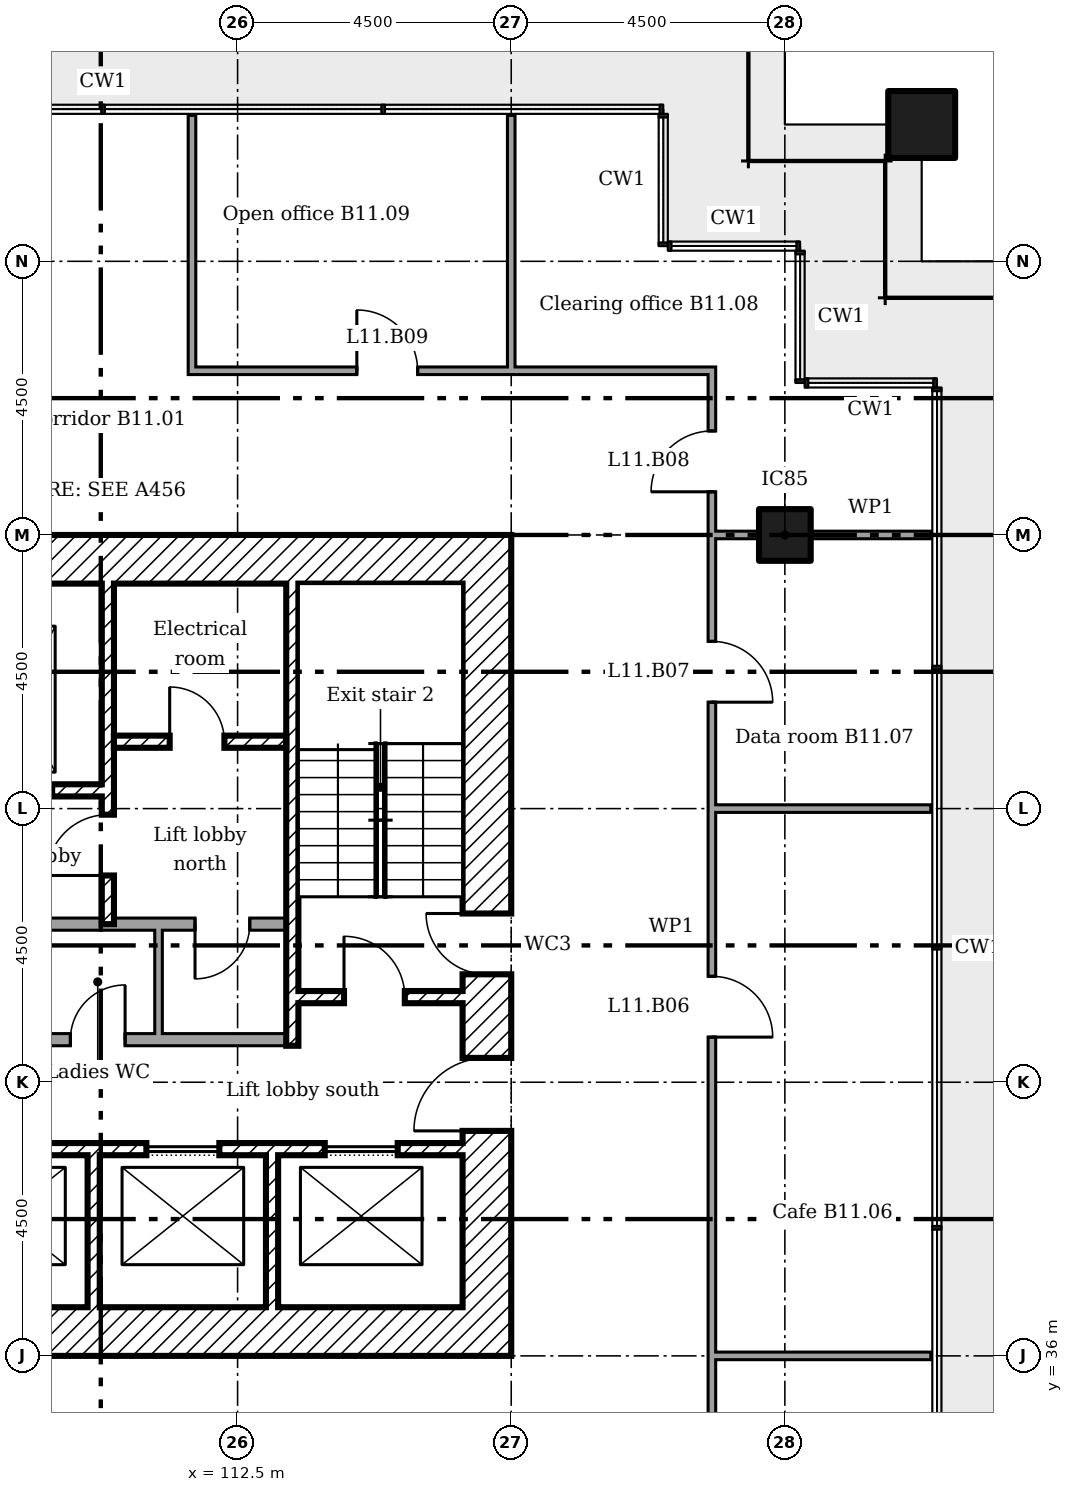
"""IFC4 building model, lengths in metres.
Left out: names, types, materials, properties, quantities, classifications, styles, units other than length and angle.
Written with IfcOpenShell. Run it as: python <this file> out.ifc"""

import sys

from ifc_helpers import new_model, si_unit, direction, frame, frame_2d, origin, origin_2d, place, context, subcontext, project, spatial, rectangle, extrude, element, fill, save


model = new_model("IFC4")
c1 = context("Model", 3, precision=1e-05, world=origin(), true_north=direction((0.0, 1.0)))
c2 = subcontext(c1, "Body", "Model", "MODEL_VIEW")
j1 = project(units=[si_unit("LENGTHUNIT", "METRE"), si_unit("PLANEANGLEUNIT", "RADIAN")], contexts=[c1])
p1 = place(None, origin())
s1 = spatial("IfcSite", under=j1, at=p1, CompositionType="ELEMENT")
p2 = place(p1, origin())
s2 = spatial("IfcBuilding", under=s1, at=p2, CompositionType="ELEMENT")
p3 = place(p2, frame((0.0, 0.0, 51.0)))
s3 = spatial("IfcBuildingStorey", under=s2, at=p3, CompositionType="ELEMENT", Elevation=51.0)
p4 = place(p3, frame((123.75, 56.25, 0.0)))
e1 = element("IfcColumn", 1, at=p4, inside=s3, PredefinedType="COLUMN", context=c2, shape_type="SweptSolid", body=[
    extrude(rectangle(XDim=1.1, YDim=1.1, at=origin_2d()), origin(), (0.0, 0.0, 1.0), 3.6),
])
p5 = place(p3, frame((121.5, 49.5, 0.0)))
e2 = element("IfcColumn", 2, at=p5, inside=s3, PredefinedType="COLUMN", context=c2, shape_type="SweptSolid", body=[
    extrude(rectangle(XDim=0.85, YDim=0.85, at=origin_2d()), origin(), (0.0, 0.0, 1.0), 3.6),
])
p6 = place(p3, frame((116.6, 36.0, 0.0), z_axis=(0.0, 0.0, 1.0), x_axis=(0.0, 1.0, 0.0)))
e3 = element("IfcWall", 3, at=p6, inside=s3, PredefinedType="SHEAR", context=c2, shape_type="SweptSolid", body=[
    extrude(rectangle(XDim=13.5, YDim=0.8, at=frame_2d((6.75, 0.0))), origin(), (0.0, 0.0, 1.0), 3.35),
])
p7 = place(p6, frame((3.7, 0.0, 0.0)))
e4 = element("IfcOpeningElement", 4, at=p7, cuts=e3, PredefinedType="OPENING", context=c2, shape_type="SweptSolid", body=[
    extrude(rectangle(XDim=1.2, YDim=2.1, at=frame_2d((0.6, 1.05))), frame((0.0, 0.41, 0.0), z_axis=(0.0, -1.0, 0.0), x_axis=(1.0, 0.0, 0.0)), (0.0, 0.0, 1.0), 0.82),
])
p8 = place(p6, frame((6.275, 0.0, 0.0)))
e5 = element("IfcOpeningElement", 5, at=p8, cuts=e3, PredefinedType="OPENING", context=c2, shape_type="SweptSolid", body=[
    extrude(rectangle(XDim=1.0, YDim=2.1, at=frame_2d((0.5, 1.05))), frame((0.0, 0.41, 0.0), z_axis=(0.0, -1.0, 0.0), x_axis=(1.0, 0.0, 0.0)), (0.0, 0.0, 1.0), 0.82),
])
for number, where in (
    (6, (104.3, 49.1, 0.0)),
    (7, (104.3, 36.4, 0.0)),
):
    element("IfcWall", number, at=place(p3, frame(where)), inside=s3, PredefinedType="SHEAR", context=c2, shape_type="SweptSolid", body=[
        extrude(rectangle(XDim=11.9, YDim=0.8, at=frame_2d((5.95, 0.0))), origin(), (0.0, 0.0, 1.0), 3.35),
    ])
p9 = place(p3, frame((110.367, 48.7, 0.0), z_axis=(0.0, 0.0, 1.0), x_axis=(0.0, -1.0, 0.0)))
e8 = element("IfcWall", 8, at=p9, inside=s3, PredefinedType="SHEAR", context=c2, shape_type="SweptSolid", body=[
    extrude(rectangle(XDim=5.6, YDim=0.2, at=frame_2d((2.8, 0.0))), origin(), (0.0, 0.0, 1.0), 3.35),
])
p10 = place(p9, frame((3.8, 0.0, 0.0)))
e9 = element("IfcOpeningElement", 9, at=p10, cuts=e8, PredefinedType="OPENING", context=c2, shape_type="SweptSolid", body=[
    extrude(rectangle(XDim=1.0, YDim=2.1, at=frame_2d((0.5, 1.05))), frame((0.0, 0.11, 0.0), z_axis=(0.0, -1.0, 0.0), x_axis=(1.0, 0.0, 0.0)), (0.0, 0.0, 1.0), 0.22),
])
for number, where, z_axis, x_axis in (
    (10, (110.133, 36.8, 0.0), (0.0, 0.0, 1.0), (0.0, 1.0, 0.0)),
    (11, (113.067, 36.8, 0.0), (0.0, 0.0, 1.0), (0.0, 1.0, 0.0)),
):
    element("IfcWall", number, at=place(p3, frame(where, z_axis=z_axis, x_axis=x_axis)), inside=s3, PredefinedType="SHEAR", context=c2, shape_type="SweptSolid", body=[
        extrude(rectangle(XDim=2.5, YDim=0.2, at=frame_2d((1.25, 0.0))), origin(), (0.0, 0.0, 1.0), 3.35),
    ])
p11 = place(p3, frame((110.467, 46.1, 0.0)))
e12 = element("IfcWall", 12, at=p11, inside=s3, PredefinedType="SHEAR", context=c2, shape_type="SweptSolid", body=[
    extrude(rectangle(XDim=2.833, YDim=0.2, at=frame_2d((1.417, 0.0))), origin(), (0.0, 0.0, 1.0), 3.35),
])
p12 = place(p11, frame((0.917, 0.0, 0.0)))
e13 = element("IfcOpeningElement", 13, at=p12, cuts=e12, PredefinedType="OPENING", context=c2, shape_type="SweptSolid", body=[
    extrude(rectangle(XDim=0.9, YDim=2.1, at=frame_2d((0.45, 1.05))), frame((0.0, 0.11, 0.0), z_axis=(0.0, -1.0, 0.0), x_axis=(1.0, 0.0, 0.0)), (0.0, 0.0, 1.0), 0.22),
])
p13 = place(p3, frame((107.533, 45.3, 0.0)))
e14 = element("IfcWall", 14, at=p13, inside=s3, PredefinedType="SHEAR", context=c2, shape_type="SweptSolid", body=[
    extrude(rectangle(XDim=2.733, YDim=0.2, at=frame_2d((1.367, 0.0))), origin(), (0.0, 0.0, 1.0), 3.35),
])
p14 = place(p13, frame((0.817, 0.0, 0.0)))
e15 = element("IfcOpeningElement", 15, at=p14, cuts=e14, PredefinedType="OPENING", context=c2, shape_type="SweptSolid", body=[
    extrude(rectangle(XDim=1.1, YDim=2.1, at=frame_2d((0.55, 1.05))), frame((0.0, 0.11, 0.0), z_axis=(0.0, -1.0, 0.0), x_axis=(1.0, 0.0, 0.0)), (0.0, 0.0, 1.0), 0.22),
])
p15 = place(p3, frame((107.2, 39.4, 0.0)))
e16 = element("IfcWall", 16, at=p15, inside=s3, PredefinedType="SHEAR", context=c2, shape_type="SweptSolid", body=[
    extrude(rectangle(XDim=9.0, YDim=0.2, at=frame_2d((4.5, 0.0))), origin(), (0.0, 0.0, 1.0), 3.35),
])
p16 = place(p15, frame((0.867, 0.0, 0.0)))
e17 = element("IfcOpeningElement", 17, at=p16, cuts=e16, PredefinedType="OPENING", context=c2, shape_type="SweptSolid", body=[
    extrude(rectangle(XDim=1.2, YDim=2.1, at=frame_2d((0.6, 1.05))), frame((0.0, 0.11, 0.0), z_axis=(0.0, -1.0, 0.0), x_axis=(1.0, 0.0, 0.0)), (0.0, 0.0, 1.0), 0.22),
])
p17 = place(p15, frame((3.8, 0.0, 0.0)))
e18 = element("IfcOpeningElement", 18, at=p17, cuts=e16, PredefinedType="OPENING", context=c2, shape_type="SweptSolid", body=[
    extrude(rectangle(XDim=1.2, YDim=2.1, at=frame_2d((0.6, 1.05))), frame((0.0, 0.11, 0.0), z_axis=(0.0, -1.0, 0.0), x_axis=(1.0, 0.0, 0.0)), (0.0, 0.0, 1.0), 0.22),
])
p18 = place(p15, frame((6.733, 0.0, 0.0)))
e19 = element("IfcOpeningElement", 19, at=p18, cuts=e16, PredefinedType="OPENING", context=c2, shape_type="SweptSolid", body=[
    extrude(rectangle(XDim=1.2, YDim=2.1, at=frame_2d((0.6, 1.05))), frame((0.0, 0.11, 0.0), z_axis=(0.0, -1.0, 0.0), x_axis=(1.0, 0.0, 0.0)), (0.0, 0.0, 1.0), 0.22),
])
p19 = place(p3, frame((113.5, 41.9, 0.0)))
e20 = element("IfcWall", 20, at=p19, inside=s3, PredefinedType="SHEAR", context=c2, shape_type="SweptSolid", body=[
    extrude(rectangle(XDim=2.7, YDim=0.2, at=frame_2d((1.35, 0.0))), origin(), (0.0, 0.0, 1.0), 3.35),
])
p20 = place(p19, frame((0.75, 0.0, 0.0)))
e21 = element("IfcOpeningElement", 21, at=p20, cuts=e20, PredefinedType="OPENING", context=c2, shape_type="SweptSolid", body=[
    extrude(rectangle(XDim=1.0, YDim=2.1, at=frame_2d((0.5, 1.05))), frame((0.0, 0.11, 0.0), z_axis=(0.0, -1.0, 0.0), x_axis=(1.0, 0.0, 0.0)), (0.0, 0.0, 1.0), 0.22),
])
p21 = place(p3, frame((113.4, 41.1, 0.0), z_axis=(0.0, 0.0, 1.0), x_axis=(0.0, 1.0, 0.0)))
e22 = element("IfcWall", 22, at=p21, inside=s3, PredefinedType="SHEAR", context=c2, shape_type="SweptSolid", body=[
    extrude(rectangle(XDim=7.6, YDim=0.2, at=frame_2d((3.8, 0.0))), origin(), (0.0, 0.0, 1.0), 3.35),
])
p22 = place(p3, frame((107.2, 43.1, 0.0)))
e23 = element("IfcWall", 23, at=p22, inside=s3, PredefinedType="PARTITIONING", context=c2, shape_type="SweptSolid", body=[
    extrude(rectangle(XDim=6.1, YDim=0.2, at=frame_2d((3.05, 0.0))), origin(), (0.0, 0.0, 1.0), 3.35),
])
p23 = place(p22, frame((4.6, 0.0, 0.0)))
e24 = element("IfcOpeningElement", 24, at=p23, cuts=e23, PredefinedType="OPENING", context=c2, shape_type="SweptSolid", body=[
    extrude(rectangle(XDim=0.9, YDim=2.1, at=frame_2d((0.45, 1.05))), frame((0.0, 0.11, 0.0), z_axis=(0.0, -1.0, 0.0), x_axis=(1.0, 0.0, 0.0)), (0.0, 0.0, 1.0), 0.22),
])
p24 = place(p3, frame((107.2, 41.2, 0.0)))
e25 = element("IfcWall", 25, at=p24, inside=s3, PredefinedType="PARTITIONING", context=c2, shape_type="SweptSolid", body=[
    extrude(rectangle(XDim=6.1, YDim=0.2, at=frame_2d((3.05, 0.0))), origin(), (0.0, 0.0, 1.0), 3.35),
])
p25 = place(p24, frame((0.55, 0.0, 0.0)))
e26 = element("IfcOpeningElement", 26, at=p25, cuts=e25, PredefinedType="OPENING", context=c2, shape_type="SweptSolid", body=[
    extrude(rectangle(XDim=0.9, YDim=2.1, at=frame_2d((0.45, 1.05))), frame((0.0, 0.11, 0.0), z_axis=(0.0, -1.0, 0.0), x_axis=(1.0, 0.0, 0.0)), (0.0, 0.0, 1.0), 0.22),
])
p26 = place(p24, frame((2.55, 0.0, 0.0)))
e27 = element("IfcOpeningElement", 27, at=p26, cuts=e25, PredefinedType="OPENING", context=c2, shape_type="SweptSolid", body=[
    extrude(rectangle(XDim=0.9, YDim=2.1, at=frame_2d((0.45, 1.05))), frame((0.0, 0.11, 0.0), z_axis=(0.0, -1.0, 0.0), x_axis=(1.0, 0.0, 0.0)), (0.0, 0.0, 1.0), 0.22),
])
p27 = place(p3, frame((111.2, 41.3, 0.0), z_axis=(0.0, 0.0, 1.0), x_axis=(0.0, 1.0, 0.0)))
e28 = element("IfcWall", 28, at=p27, inside=s3, PredefinedType="PARTITIONING", context=c2, shape_type="SweptSolid", body=[
    extrude(rectangle(XDim=1.7, YDim=0.125, at=frame_2d((0.85, 0.0))), origin(), (0.0, 0.0, 1.0), 3.35),
])
for number, where in (
    (29, (120.3, 36.0, 0.0)),
    (30, (120.3, 45.0, 0.0)),
):
    element("IfcWall", number, at=place(p3, frame(where)), inside=s3, PredefinedType="PARTITIONING", context=c2, shape_type="SweptSolid", body=[
        extrude(rectangle(XDim=3.6, YDim=0.125, at=frame_2d((1.8, 0.0))), origin(), (0.0, 0.0, 1.0), 2.851),
    ])
p28 = place(p3, frame((120.3, 49.5, 0.0)))
e31 = element("IfcWall", 31, at=p28, inside=s3, PredefinedType="PARTITIONING", context=c2, shape_type="SweptSolid", body=[
    extrude(rectangle(XDim=0.775, YDim=0.125, at=frame_2d((0.387, 0.0))), origin(), (0.0, 0.0, 1.0), 2.842),
])
p29 = place(p3, frame((121.925, 49.5, 0.0)))
e32 = element("IfcWall", 32, at=p29, inside=s3, PredefinedType="PARTITIONING", context=c2, shape_type="SweptSolid", body=[
    extrude(rectangle(XDim=1.975, YDim=0.125, at=frame_2d((0.987, 0.0))), origin(), (0.0, 0.0, 1.0), 2.842),
])
p30 = place(p3, frame((111.688, 52.2, 0.0)))
e33 = element("IfcWall", 33, at=p30, inside=s3, PredefinedType="PARTITIONING", context=c2, shape_type="SweptSolid", body=[
    extrude(rectangle(XDim=8.675, YDim=0.125, at=frame_2d((4.337, 0.0))), origin(), (0.0, 0.0, 1.0), 3.45),
])
p31 = place(p30, frame((2.773, 0.0, 0.0)))
e34 = element("IfcOpeningElement", 34, at=p31, cuts=e33, PredefinedType="OPENING", context=c2, shape_type="SweptSolid", body=[
    extrude(rectangle(XDim=1.0, YDim=2.1, at=frame_2d((0.5, 1.05))), frame((0.0, 0.073, 0.0), z_axis=(0.0, -1.0, 0.0), x_axis=(1.0, 0.0, 0.0)), (0.0, 0.0, 1.0), 0.145),
])
p32 = place(p3, frame((111.75, 52.262, 0.0), z_axis=(0.0, 0.0, 1.0), x_axis=(0.0, 1.0, 0.0)))
e35 = element("IfcWall", 35, at=p32, inside=s3, PredefinedType="PARTITIONING", context=c2, shape_type="SweptSolid", body=[
    extrude(rectangle(XDim=4.137, YDim=0.125, at=frame_2d((2.069, 0.0))), origin(), (0.0, 0.0, 1.0), 3.45),
])
p33 = place(p3, frame((117.0, 52.2, 0.0), z_axis=(0.0, 0.0, 1.0), x_axis=(0.0, 1.0, 0.0)))
e36 = element("IfcWall", 36, at=p33, inside=s3, PredefinedType="PARTITIONING", context=c2, shape_type="SweptSolid", body=[
    extrude(rectangle(XDim=4.2, YDim=0.125, at=frame_2d((2.1, 0.0))), origin(), (0.0, 0.0, 1.0), 2.851),
])
p34 = place(p3, frame((120.3, 33.962, 0.0), z_axis=(0.0, 0.0, 1.0), x_axis=(0.0, 1.0, 0.0)))
e37 = element("IfcWall", 37, at=p34, inside=s3, PredefinedType="PARTITIONING", context=c2, shape_type="SweptSolid", body=[
    extrude(rectangle(XDim=18.175, YDim=0.125, at=frame_2d((9.087, 0.0))), origin(), (0.0, 0.0, 1.0), 3.45),
])
p35 = place(p34, frame((7.28, 0.0, 0.0)))
e38 = element("IfcOpeningElement", 38, at=p35, cuts=e37, PredefinedType="OPENING", context=c2, shape_type="SweptSolid", body=[
    extrude(rectangle(XDim=1.0, YDim=2.1, at=frame_2d((0.5, 1.05))), frame((0.0, 0.073, 0.0), z_axis=(0.0, -1.0, 0.0), x_axis=(1.0, 0.0, 0.0)), (0.0, 0.0, 1.0), 0.145),
])
p36 = place(p34, frame((12.788, 0.0, 0.0)))
e39 = element("IfcOpeningElement", 39, at=p36, cuts=e37, PredefinedType="OPENING", context=c2, shape_type="SweptSolid", body=[
    extrude(rectangle(XDim=1.0, YDim=2.1, at=frame_2d((0.5, 1.05))), frame((0.0, 0.073, 0.0), z_axis=(0.0, -1.0, 0.0), x_axis=(1.0, 0.0, 0.0)), (0.0, 0.0, 1.0), 0.145),
])
p37 = place(p34, frame((16.248, 0.0, 0.0)))
e40 = element("IfcOpeningElement", 40, at=p37, cuts=e37, PredefinedType="OPENING", context=c2, shape_type="SweptSolid", body=[
    extrude(rectangle(XDim=1.0, YDim=2.1, at=frame_2d((0.5, 1.05))), frame((0.0, 0.073, 0.0), z_axis=(0.0, -1.0, 0.0), x_axis=(1.0, 0.0, 0.0)), (0.0, 0.0, 1.0), 0.145),
])
p38 = place(p7, origin())
e41 = element("IfcDoor", 41, at=p38, inside=s3, OperationType="SINGLE_SWING_RIGHT", PredefinedType="DOOR", context=c2, shape_type="SweptSolid", body=[
    extrude(rectangle(XDim=1.2, YDim=2.1, at=frame_2d((0.6, 1.05))), frame((0.0, 0.025, 0.0), z_axis=(0.0, -1.0, 0.0), x_axis=(1.0, 0.0, 0.0)), (0.0, 0.0, 1.0), 0.05),
])
fill(e4, e41)
p39 = place(p20, origin())
e42 = element("IfcDoor", 42, at=p39, inside=s3, OperationType="SINGLE_SWING_RIGHT", PredefinedType="DOOR", context=c2, shape_type="SweptSolid", body=[
    extrude(rectangle(XDim=1.0, YDim=2.1, at=frame_2d((0.5, 1.05))), frame((0.0, 0.025, 0.0), z_axis=(0.0, -1.0, 0.0), x_axis=(1.0, 0.0, 0.0)), (0.0, 0.0, 1.0), 0.05),
])
fill(e21, e42)
p40 = place(p8, origin())
e43 = element("IfcDoor", 43, at=p40, inside=s3, OperationType="SINGLE_SWING_LEFT", PredefinedType="DOOR", context=c2, shape_type="SweptSolid", body=[
    extrude(rectangle(XDim=1.0, YDim=2.1, at=frame_2d((0.5, 1.05))), frame((0.0, 0.025, 0.0), z_axis=(0.0, -1.0, 0.0), x_axis=(1.0, 0.0, 0.0)), (0.0, 0.0, 1.0), 0.05),
])
fill(e5, e43)
p41 = place(p10, frame((1.0, 0.0, 0.0), x_axis=(-1.0, 0.0, 0.0)))
e44 = element("IfcDoor", 44, at=p41, inside=s3, OperationType="SINGLE_SWING_RIGHT", PredefinedType="DOOR", context=c2, shape_type="SweptSolid", body=[
    extrude(rectangle(XDim=1.0, YDim=2.1, at=frame_2d((0.5, 1.05))), frame((0.0, 0.025, 0.0), z_axis=(0.0, -1.0, 0.0), x_axis=(1.0, 0.0, 0.0)), (0.0, 0.0, 1.0), 0.05),
])
fill(e9, e44)
p42 = place(p12, origin())
e45 = element("IfcDoor", 45, at=p42, inside=s3, OperationType="SINGLE_SWING_RIGHT", PredefinedType="DOOR", context=c2, shape_type="SweptSolid", body=[
    extrude(rectangle(XDim=0.9, YDim=2.1, at=frame_2d((0.45, 1.05))), frame((0.0, 0.025, 0.0), z_axis=(0.0, -1.0, 0.0), x_axis=(1.0, 0.0, 0.0)), (0.0, 0.0, 1.0), 0.05),
])
fill(e13, e45)
p43 = place(p26, origin())
e46 = element("IfcDoor", 46, at=p43, inside=s3, OperationType="SINGLE_SWING_LEFT", PredefinedType="DOOR", context=c2, shape_type="SweptSolid", body=[
    extrude(rectangle(XDim=0.9, YDim=2.1, at=frame_2d((0.45, 1.05))), frame((0.0, 0.025, 0.0), z_axis=(0.0, -1.0, 0.0), x_axis=(1.0, 0.0, 0.0)), (0.0, 0.0, 1.0), 0.05),
])
fill(e27, e46)
p44 = place(p23, frame((0.9, 0.0, 0.0), x_axis=(-1.0, 0.0, 0.0)))
e47 = element("IfcDoor", 47, at=p44, inside=s3, OperationType="SINGLE_SWING_LEFT", PredefinedType="DOOR", context=c2, shape_type="SweptSolid", body=[
    extrude(rectangle(XDim=0.9, YDim=2.1, at=frame_2d((0.45, 1.05))), frame((0.0, 0.025, 0.0), z_axis=(0.0, -1.0, 0.0), x_axis=(1.0, 0.0, 0.0)), (0.0, 0.0, 1.0), 0.05),
])
fill(e24, e47)
p45 = place(p17, origin())
e48 = element("IfcDoor", 48, at=p45, inside=s3, OperationType="SLIDING_TO_LEFT", PredefinedType="DOOR", context=c2, shape_type="SweptSolid", body=[
    extrude(rectangle(XDim=1.2, YDim=2.1, at=frame_2d((0.6, 1.05))), frame((0.0, 0.025, 0.0), z_axis=(0.0, -1.0, 0.0), x_axis=(1.0, 0.0, 0.0)), (0.0, 0.0, 1.0), 0.05),
])
fill(e18, e48)
p46 = place(p18, origin())
e49 = element("IfcDoor", 49, at=p46, inside=s3, OperationType="SLIDING_TO_LEFT", PredefinedType="DOOR", context=c2, shape_type="SweptSolid", body=[
    extrude(rectangle(XDim=1.2, YDim=2.1, at=frame_2d((0.6, 1.05))), frame((0.0, 0.025, 0.0), z_axis=(0.0, -1.0, 0.0), x_axis=(1.0, 0.0, 0.0)), (0.0, 0.0, 1.0), 0.05),
])
fill(e19, e49)
p47 = place(p35, frame((1.0, 0.0, 0.0), x_axis=(-1.0, 0.0, 0.0)))
e50 = element("IfcDoor", 50, at=p47, inside=s3, OperationType="SINGLE_SWING_LEFT", PredefinedType="DOOR", context=c2, shape_type="SweptSolid", body=[
    extrude(rectangle(XDim=1.0, YDim=2.1, at=frame_2d((0.5, 1.05))), frame((0.0, 0.025, 0.0), z_axis=(0.0, -1.0, 0.0), x_axis=(1.0, 0.0, 0.0)), (0.0, 0.0, 1.0), 0.05),
])
fill(e38, e50)
p48 = place(p36, frame((1.0, 0.0, 0.0), x_axis=(-1.0, 0.0, 0.0)))
e51 = element("IfcDoor", 51, at=p48, inside=s3, OperationType="SINGLE_SWING_LEFT", PredefinedType="DOOR", context=c2, shape_type="SweptSolid", body=[
    extrude(rectangle(XDim=1.0, YDim=2.1, at=frame_2d((0.5, 1.05))), frame((0.0, 0.025, 0.0), z_axis=(0.0, -1.0, 0.0), x_axis=(1.0, 0.0, 0.0)), (0.0, 0.0, 1.0), 0.05),
])
fill(e39, e51)
p49 = place(p37, origin())
e52 = element("IfcDoor", 52, at=p49, inside=s3, OperationType="SINGLE_SWING_RIGHT", PredefinedType="DOOR", context=c2, shape_type="SweptSolid", body=[
    extrude(rectangle(XDim=1.0, YDim=2.1, at=frame_2d((0.5, 1.05))), frame((0.0, 0.025, 0.0), z_axis=(0.0, -1.0, 0.0), x_axis=(1.0, 0.0, 0.0)), (0.0, 0.0, 1.0), 0.05),
])
fill(e40, e52)
p50 = place(p31, origin())
e53 = element("IfcDoor", 53, at=p50, inside=s3, OperationType="SINGLE_SWING_RIGHT", PredefinedType="DOOR", context=c2, shape_type="SweptSolid", body=[
    extrude(rectangle(XDim=1.0, YDim=2.1, at=frame_2d((0.5, 1.05))), frame((0.0, 0.025, 0.0), z_axis=(0.0, -1.0, 0.0), x_axis=(1.0, 0.0, 0.0)), (0.0, 0.0, 1.0), 0.05),
])
fill(e34, e53)
save(model, sys.argv[1])
